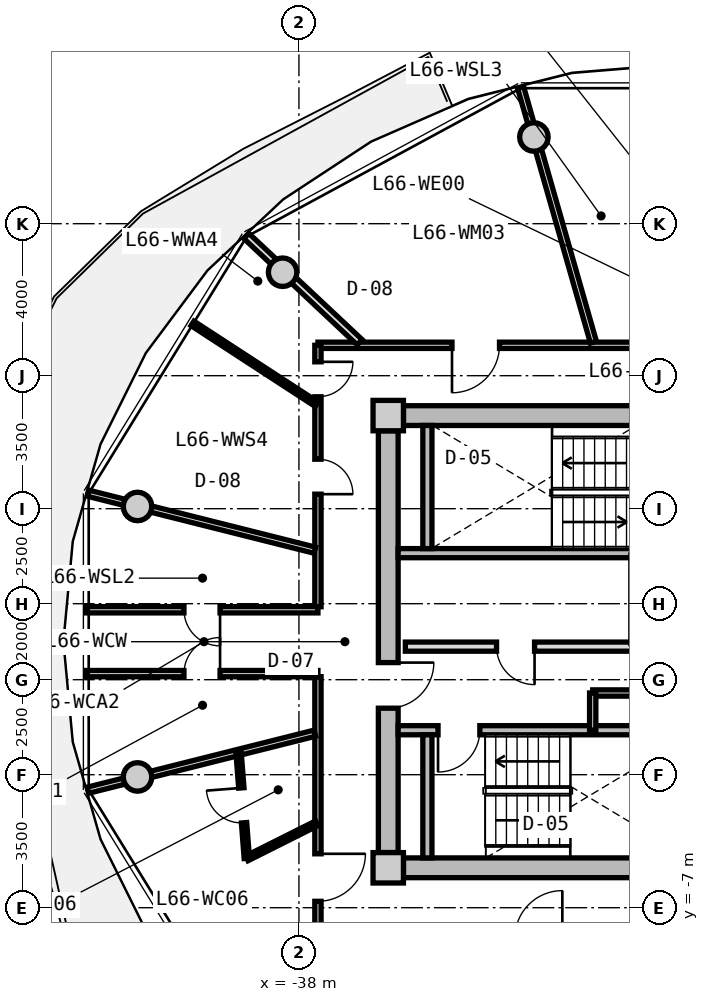
"""IFC4 building model, lengths in metres.
Left out: names, types, materials, properties, quantities, classifications, styles, units other than length and angle.
Written with IfcOpenShell. Run it as: python <this file> out.ifc"""

import sys

from ifc_helpers import new_model, si_unit, direction, frame, frame_2d, origin, origin_2d, place, context, subcontext, project, spatial, rectangle, circle, extrude, source, transform, mapped, element, fill, save


model = new_model("IFC4")
c1 = context("Model", 3, precision=1e-05, world=origin(), true_north=direction((0.0, 1.0)))
c2 = subcontext(c1, "Body", "Model", "MODEL_VIEW")
j1 = project(units=[si_unit("LENGTHUNIT", "METRE"), si_unit("PLANEANGLEUNIT", "RADIAN")], contexts=[c1])
p1 = place(None, origin())
s1 = spatial("IfcSite", under=j1, at=p1, CompositionType="ELEMENT")
p2 = place(p1, origin())
s2 = spatial("IfcBuilding", under=s1, at=p2, CompositionType="ELEMENT")
p3 = place(p2, frame((0.0, 0.0, 213.9)))
s3 = spatial("IfcBuildingStorey", under=s2, at=p3, CompositionType="ELEMENT", Elevation=213.9)
m1 = source(origin(), c2, "Body", "SweptSolid", [
    extrude(rectangle(XDim=0.8, YDim=0.8, at=origin_2d()), origin(), (0.0, 0.0, 1.0), 3.05),
])
for number, where, z_axis, x_axis in (
    (1, (-35.65, -5.95, 0.0), (0.0, 0.0, 1.0), (1.0, 0.0, 0.0)),
    (2, (-35.65, 5.95, 0.0), (0.0, 0.0, 1.0), (1.0, 0.0, 0.0)),
):
    element("IfcColumn", number, at=place(p3, frame(where, z_axis=z_axis, x_axis=x_axis)), inside=s3, PredefinedType="COLUMN", context=c2, shape_type="MappedRepresentation", body=[
        mapped(m1, transform((0.0, 0.0, 0.0), x_axis=(1.0, 0.0, 0.0), y_axis=(0.0, 1.0, 0.0), z_axis=(0.0, 0.0, 1.0), scale=1.0)),
    ])
m2 = source(origin(), c2, "Body", "SweptSolid", [
    extrude(rectangle(XDim=14.5, YDim=0.52, at=frame_2d((7.25, 0.0))), origin(), (0.0, 0.0, 1.0), 2.76),
])
for number, where, z_axis, x_axis in (
    (3, (-35.25, 5.95, 0.0), (0.0, 0.0, 1.0), (1.0, 0.0, 0.0)),
    (4, (-20.75, -5.95, 0.0), (0.0, 0.0, 1.0), (-1.0, 0.0, 0.0)),
):
    element("IfcWall", number, at=place(p3, frame(where, z_axis=z_axis, x_axis=x_axis)), inside=s3, PredefinedType="SHEAR", context=c2, shape_type="MappedRepresentation", body=[
        mapped(m2, transform((0.0, 0.0, 0.0), x_axis=(1.0, 0.0, 0.0), y_axis=(0.0, 1.0, 0.0), z_axis=(0.0, 0.0, 1.0), scale=1.0)),
    ])
m3 = source(origin(), c2, "Body", "SweptSolid", [
    extrude(rectangle(XDim=11.1, YDim=0.52, at=frame_2d((5.55, 0.0))), origin(), (0.0, 0.0, 1.0), 2.76),
])
p4 = place(p3, frame((-35.65, -5.55, 0.0), z_axis=(0.0, 0.0, 1.0), x_axis=(0.0, 1.0, 0.0)))
e5 = element("IfcWall", 5, at=p4, inside=s3, PredefinedType="SHEAR", context=c2, shape_type="MappedRepresentation", body=[
    mapped(m3, transform((0.0, 0.0, 0.0), x_axis=(1.0, 0.0, 0.0), y_axis=(0.0, 1.0, 0.0), z_axis=(0.0, 0.0, 1.0), scale=1.0)),
])
p5 = place(p4, frame((3.8, 0.0, 0.0)))
e6 = element("IfcOpeningElement", 6, at=p5, cuts=e5, PredefinedType="OPENING", context=c2, shape_type="SweptSolid", body=[
    extrude(rectangle(XDim=1.2, YDim=2.15, at=frame_2d((0.6, 1.075))), frame((0.0, 0.27, 0.0), z_axis=(0.0, -1.0, 0.0), x_axis=(1.0, 0.0, 0.0)), (0.0, 0.0, 1.0), 0.54),
])
m4 = source(origin(), c2, "Body", "SweptSolid", [
    extrude(circle(Radius=0.375, at=origin_2d()), origin(), (0.0, 0.0, 1.0), 3.05),
])
for number, where, z_axis, x_axis in (
    (7, (-31.818, 13.281, 0.0), (0.0, 0.0, 1.0), (1.0, 0.0, 0.0)),
    (8, (-38.43, 9.723, 0.0), (0.0, 0.0, 1.0), (1.0, 0.0, 0.0)),
    (9, (-42.247, 3.559, 0.0), (0.0, 0.0, 1.0), (1.0, 0.0, 0.0)),
    (10, (-42.247, -3.559, 0.0), (0.0, 0.0, 1.0), (1.0, 0.0, 0.0)),
):
    element("IfcColumn", number, at=place(p3, frame(where, z_axis=z_axis, x_axis=x_axis)), inside=s3, PredefinedType="COLUMN", context=c2, shape_type="MappedRepresentation", body=[
        mapped(m4, transform((0.0, 0.0, 0.0), x_axis=(1.0, 0.0, 0.0), y_axis=(0.0, 1.0, 0.0), z_axis=(0.0, 0.0, 1.0), scale=1.0)),
    ])
m5 = source(origin(), c2, "Body", "SweptSolid", [
    extrude(rectangle(XDim=7.93, YDim=0.24, at=frame_2d((3.965, 0.0))), origin(), (0.0, 0.0, 1.0), 2.76),
])
p6 = place(p3, frame((-35.39, 2.33, 0.0), z_axis=(0.0, 0.0, 1.0), x_axis=(1.0, 0.0, 0.0)))
e11 = element("IfcWall", 11, at=p6, inside=s3, PredefinedType="PARTITIONING", context=c2, shape_type="MappedRepresentation", body=[
    mapped(m5, transform((0.0, 0.0, 0.0), x_axis=(1.0, 0.0, 0.0), y_axis=(0.0, 1.0, 0.0), z_axis=(0.0, 0.0, 1.0), scale=1.0)),
])
m6 = source(origin(), c2, "Body", "SweptSolid", [
    extrude(rectangle(XDim=3.24, YDim=0.24, at=frame_2d((1.62, 0.0))), origin(), (0.0, 0.0, 1.0), 2.76),
])
p7 = place(p3, frame((-34.62, 2.45, 0.0), z_axis=(0.0, 0.0, 1.0), x_axis=(0.0, 1.0, 0.0)))
e12 = element("IfcWall", 12, at=p7, inside=s3, PredefinedType="PARTITIONING", context=c2, shape_type="MappedRepresentation", body=[
    mapped(m6, transform((0.0, 0.0, 0.0), x_axis=(1.0, 0.0, 0.0), y_axis=(0.0, 1.0, 0.0), z_axis=(0.0, 0.0, 1.0), scale=1.0)),
])
p8 = place(p3, frame((-35.39, -2.33, 0.0), z_axis=(0.0, 0.0, 1.0), x_axis=(1.0, 0.0, 0.0)))
e13 = element("IfcWall", 13, at=p8, inside=s3, PredefinedType="PARTITIONING", context=c2, shape_type="MappedRepresentation", body=[
    mapped(m5, transform((0.0, 0.0, 0.0), x_axis=(1.0, 0.0, 0.0), y_axis=(0.0, 1.0, 0.0), z_axis=(0.0, 0.0, 1.0), scale=1.0)),
])
p9 = place(p8, frame((1.05, 0.0, 0.0)))
e14 = element("IfcOpeningElement", 14, at=p9, cuts=e13, PredefinedType="OPENING", context=c2, shape_type="SweptSolid", body=[
    extrude(rectangle(XDim=1.1, YDim=2.15, at=frame_2d((0.55, 1.075))), frame((0.0, 0.13, 0.0), z_axis=(0.0, -1.0, 0.0), x_axis=(1.0, 0.0, 0.0)), (0.0, 0.0, 1.0), 0.26),
])
p10 = place(p3, frame((-34.62, -5.69, 0.0), z_axis=(0.0, 0.0, 1.0), x_axis=(0.0, 1.0, 0.0)))
e15 = element("IfcWall", 15, at=p10, inside=s3, PredefinedType="PARTITIONING", context=c2, shape_type="MappedRepresentation", body=[
    mapped(m6, transform((0.0, 0.0, 0.0), x_axis=(1.0, 0.0, 0.0), y_axis=(0.0, 1.0, 0.0), z_axis=(0.0, 0.0, 1.0), scale=1.0)),
])
m7 = source(origin(), c2, "Body", "SweptSolid", [
    extrude(rectangle(XDim=7.62, YDim=0.24, at=frame_2d((3.81, 0.0))), origin(), (0.0, 0.0, 1.0), 2.745),
])
p11 = place(p3, frame((-35.2, -0.13, 0.0), z_axis=(0.0, 0.0, 1.0), x_axis=(1.0, 0.0, 0.0)))
e16 = element("IfcWall", 16, at=p11, inside=s3, PredefinedType="PARTITIONING", context=c2, shape_type="MappedRepresentation", body=[
    mapped(m7, transform((0.0, 0.0, 0.0), x_axis=(1.0, 0.0, 0.0), y_axis=(0.0, 1.0, 0.0), z_axis=(0.0, 0.0, 1.0), scale=1.0)),
])
p12 = place(p11, frame((6.22, 0.0, 0.0)))
e17 = element("IfcOpeningElement", 17, at=p12, cuts=e16, PredefinedType="OPENING", context=c2, shape_type="SweptSolid", body=[
    extrude(rectangle(XDim=1.0, YDim=2.1, at=frame_2d((0.5, 1.05))), frame((0.0, 0.13, 0.0), z_axis=(0.0, -1.0, 0.0), x_axis=(1.0, 0.0, 0.0)), (0.0, 0.0, 1.0), 0.26),
])
p13 = place(p11, frame((2.4, 0.0, 0.0)))
e18 = element("IfcOpeningElement", 18, at=p13, cuts=e16, PredefinedType="OPENING", context=c2, shape_type="SweptSolid", body=[
    extrude(rectangle(XDim=1.0, YDim=2.1, at=frame_2d((0.5, 1.05))), frame((0.0, 0.13, 0.0), z_axis=(0.0, -1.0, 0.0), x_axis=(1.0, 0.0, 0.0)), (0.0, 0.0, 1.0), 0.26),
])
m8 = source(origin(), c2, "Body", "SweptSolid", [
    extrude(rectangle(XDim=4.77, YDim=0.165, at=frame_2d((2.385, 0.0))), origin(), (0.0, 0.0, 1.0), 2.745),
])
p14 = place(p3, frame((-30.27, -1.35, 0.0), z_axis=(0.0, 0.0, 1.0), x_axis=(1.0, 0.0, 0.0)))
e19 = element("IfcWall", 19, at=p14, inside=s3, PredefinedType="PARTITIONING", context=c2, shape_type="MappedRepresentation", body=[
    mapped(m8, transform((0.0, 0.0, 0.0), x_axis=(1.0, 0.0, 0.0), y_axis=(0.0, 1.0, 0.0), z_axis=(0.0, 0.0, 1.0), scale=1.0)),
])
p15 = place(p14, frame((1.85, 0.0, 0.0)))
e20 = element("IfcOpeningElement", 20, at=p15, cuts=e19, PredefinedType="OPENING", context=c2, shape_type="SweptSolid", body=[
    extrude(rectangle(XDim=1.0, YDim=2.1, at=frame_2d((0.5, 1.05))), frame((0.0, 0.093, 0.0), z_axis=(0.0, -1.0, 0.0), x_axis=(1.0, 0.0, 0.0)), (0.0, 0.0, 1.0), 0.185),
])
m9 = source(origin(), c2, "Body", "SweptSolid", [
    extrude(rectangle(XDim=0.98, YDim=0.165, at=frame_2d((0.49, 0.0))), origin(), (0.0, 0.0, 1.0), 2.745),
])
p16 = place(p3, frame((-30.27, -2.33, 0.0), z_axis=(0.0, 0.0, 1.0), x_axis=(0.0, 1.0, 0.0)))
e21 = element("IfcWall", 21, at=p16, inside=s3, PredefinedType="PARTITIONING", context=c2, shape_type="MappedRepresentation", body=[
    mapped(m9, transform((0.0, 0.0, 0.0), x_axis=(1.0, 0.0, 0.0), y_axis=(0.0, 1.0, 0.0), z_axis=(0.0, 0.0, 1.0), scale=1.0)),
])
m10 = source(origin(), c2, "Body", "SweptSolid", [
    extrude(rectangle(XDim=8.58, YDim=0.165, at=frame_2d((4.29, 0.0))), origin(), (0.0, 0.0, 1.0), 2.745),
])
p17 = place(p3, frame((-37.5, 7.8, 0.0), z_axis=(0.0, 0.0, 1.0), x_axis=(1.0, 0.0, 0.0)))
e22 = element("IfcWall", 22, at=p17, inside=s3, PredefinedType="PARTITIONING", context=c2, shape_type="MappedRepresentation", body=[
    mapped(m10, transform((0.0, 0.0, 0.0), x_axis=(1.0, 0.0, 0.0), y_axis=(0.0, 1.0, 0.0), z_axis=(0.0, 0.0, 1.0), scale=1.0)),
])
p18 = place(p17, frame((3.528, 0.0, 0.0)))
e23 = element("IfcOpeningElement", 23, at=p18, cuts=e22, PredefinedType="OPENING", context=c2, shape_type="SweptSolid", body=[
    extrude(rectangle(XDim=1.25, YDim=2.2, at=frame_2d((0.625, 1.1))), frame((0.0, 0.093, 0.0), z_axis=(0.0, -1.0, 0.0), x_axis=(1.0, 0.0, 0.0)), (0.0, 0.0, 1.0), 0.185),
])
m11 = source(origin(), c2, "Body", "SweptSolid", [
    extrude(rectangle(XDim=6.88, YDim=0.165, at=frame_2d((3.44, 0.0))), origin(), (0.0, 0.0, 1.0), 2.745),
])
p19 = place(p3, frame((-37.5, -7.8, 0.0), z_axis=(0.0, 0.0, 1.0), x_axis=(0.0, 1.0, 0.0)))
e24 = element("IfcWall", 24, at=p19, inside=s3, PredefinedType="PARTITIONING", context=c2, shape_type="MappedRepresentation", body=[
    mapped(m11, transform((0.0, 0.0, 0.0), x_axis=(1.0, 0.0, 0.0), y_axis=(0.0, 1.0, 0.0), z_axis=(0.0, 0.0, 1.0), scale=1.0)),
])
p20 = place(p19, frame((0.968, 0.0, 0.0)))
e25 = element("IfcOpeningElement", 25, at=p20, cuts=e24, PredefinedType="OPENING", context=c2, shape_type="SweptSolid", body=[
    extrude(rectangle(XDim=1.25, YDim=2.2, at=frame_2d((0.625, 1.1))), frame((0.0, 0.093, 0.0), z_axis=(0.0, -1.0, 0.0), x_axis=(1.0, 0.0, 0.0)), (0.0, 0.0, 1.0), 0.185),
])
p21 = place(p3, frame((-37.5, 0.92, 0.0), z_axis=(0.0, 0.0, 1.0), x_axis=(0.0, 1.0, 0.0)))
e26 = element("IfcWall", 26, at=p21, inside=s3, PredefinedType="PARTITIONING", context=c2, shape_type="MappedRepresentation", body=[
    mapped(m11, transform((0.0, 0.0, 0.0), x_axis=(1.0, 0.0, 0.0), y_axis=(0.0, 1.0, 0.0), z_axis=(0.0, 0.0, 1.0), scale=1.0)),
])
p22 = place(p21, frame((5.525, 0.0, 0.0)))
e27 = element("IfcOpeningElement", 27, at=p22, cuts=e26, PredefinedType="OPENING", context=c2, shape_type="SweptSolid", body=[
    extrude(rectangle(XDim=0.92, YDim=2.1, at=frame_2d((0.46, 1.05))), frame((0.0, 0.093, 0.0), z_axis=(0.0, -1.0, 0.0), x_axis=(1.0, 0.0, 0.0)), (0.0, 0.0, 1.0), 0.185),
])
p23 = place(p21, frame((2.962, 0.0, 0.0)))
e28 = element("IfcOpeningElement", 28, at=p23, cuts=e26, PredefinedType="OPENING", context=c2, shape_type="SweptSolid", body=[
    extrude(rectangle(XDim=0.92, YDim=2.1, at=frame_2d((0.46, 1.05))), frame((0.0, 0.093, 0.0), z_axis=(0.0, -1.0, 0.0), x_axis=(1.0, 0.0, 0.0)), (0.0, 0.0, 1.0), 0.185),
])
m12 = source(origin(), c2, "Body", "SweptSolid", [
    extrude(rectangle(XDim=6.974, YDim=0.165, at=frame_2d((3.487, 0.0))), origin(), (0.0, 0.0, 1.0), 2.345),
])
p24 = place(p3, frame((-30.251, 7.88, 0.0), z_axis=(0.0, 0.0, 1.0), x_axis=(-0.274707256801, 0.961527910703, 0.0)))
e29 = element("IfcWall", 29, at=p24, inside=s3, PredefinedType="PARTITIONING", context=c2, shape_type="MappedRepresentation", body=[
    mapped(m12, transform((0.0, 0.0, 0.0), x_axis=(1.0, 0.0, 0.0), y_axis=(0.0, 1.0, 0.0), z_axis=(0.0, 0.0, 1.0), scale=1.0)),
])
m13 = source(origin(), c2, "Body", "SweptSolid", [
    extrude(rectangle(XDim=6.157, YDim=0.165, at=frame_2d((3.079, 0.0))), origin(), (0.0, 0.0, 1.0), 2.345),
])
for number, where, z_axis, x_axis in (
    (30, (-37.58, 2.407, 0.0), (0.0, 0.0, 1.0), (-0.97, 0.244, 0.0)),
    (31, (-37.58, -2.407, 0.0), (0.0, 0.0, 1.0), (-0.97, -0.244, 0.0)),
):
    element("IfcWall", number, at=place(p3, frame(where, z_axis=z_axis, x_axis=x_axis)), inside=s3, PredefinedType="PARTITIONING", context=c2, shape_type="MappedRepresentation", body=[
        mapped(m13, transform((0.0, 0.0, 0.0), x_axis=(1.0, 0.0, 0.0), y_axis=(0.0, 1.0, 0.0), z_axis=(0.0, 0.0, 1.0), scale=1.0)),
    ])
m14 = source(origin(), c2, "Body", "SweptSolid", [
    extrude(rectangle(XDim=6.101, YDim=0.165, at=frame_2d((3.051, 0.0))), origin(), (0.0, 0.0, 1.0), 2.745),
])
p25 = place(p3, frame((-43.601, 0.84, 0.0), z_axis=(0.0, 0.0, 1.0), x_axis=(1.0, 0.0, 0.0)))
e32 = element("IfcWall", 32, at=p25, inside=s3, PredefinedType="PARTITIONING", context=c2, shape_type="MappedRepresentation", body=[
    mapped(m14, transform((0.0, 0.0, 0.0), x_axis=(1.0, 0.0, 0.0), y_axis=(0.0, 1.0, 0.0), z_axis=(0.0, 0.0, 1.0), scale=1.0)),
])
p26 = place(p25, frame((2.576, 0.0, 0.0)))
e33 = element("IfcOpeningElement", 33, at=p26, cuts=e32, PredefinedType="OPENING", context=c2, shape_type="SweptSolid", body=[
    extrude(rectangle(XDim=0.95, YDim=2.1, at=frame_2d((0.475, 1.05))), frame((0.0, 0.093, 0.0), z_axis=(0.0, -1.0, 0.0), x_axis=(1.0, 0.0, 0.0)), (0.0, 0.0, 1.0), 0.185),
])
p27 = place(p3, frame((-37.5, -0.84, 0.0), z_axis=(0.0, 0.0, 1.0), x_axis=(-1.0, 0.0, 0.0)))
e34 = element("IfcWall", 34, at=p27, inside=s3, PredefinedType="PARTITIONING", context=c2, shape_type="MappedRepresentation", body=[
    mapped(m14, transform((0.0, 0.0, 0.0), x_axis=(1.0, 0.0, 0.0), y_axis=(0.0, 1.0, 0.0), z_axis=(0.0, 0.0, 1.0), scale=1.0)),
])
p28 = place(p27, frame((2.576, 0.0, 0.0)))
e35 = element("IfcOpeningElement", 35, at=p28, cuts=e34, PredefinedType="OPENING", context=c2, shape_type="SweptSolid", body=[
    extrude(rectangle(XDim=0.95, YDim=2.1, at=frame_2d((0.475, 1.05))), frame((0.0, 0.093, 0.0), z_axis=(0.0, -1.0, 0.0), x_axis=(1.0, 0.0, 0.0)), (0.0, 0.0, 1.0), 0.185),
])
m15 = source(origin(), c2, "Body", "SweptSolid", [
    extrude(rectangle(XDim=4.089, YDim=0.19, at=frame_2d((2.044, 0.0))), origin(), (0.0, 0.0, 1.0), 2.345),
])
p29 = place(p3, frame((-36.402, 7.88, 0.0), z_axis=(0.0, 0.0, 1.0), x_axis=(-0.729401273609, 0.684086092577, 0.0)))
e36 = element("IfcWall", 36, at=p29, inside=s3, PredefinedType="PARTITIONING", context=c2, shape_type="MappedRepresentation", body=[
    mapped(m15, transform((0.0, 0.0, 0.0), x_axis=(1.0, 0.0, 0.0), y_axis=(0.0, 1.0, 0.0), z_axis=(0.0, 0.0, 1.0), scale=1.0)),
])
m16 = source(origin(), c2, "Body", "SweptSolid", [
    extrude(rectangle(XDim=3.904, YDim=0.14, at=frame_2d((1.952, 0.0))), origin(), (0.0, 0.0, 1.0), 2.745),
])
p30 = place(p3, frame((-37.53, 6.246, 0.0), z_axis=(0.0, 0.0, 1.0), x_axis=(-0.838024687996, 0.545632314209, 0.0)))
e37 = element("IfcWall", 37, at=p30, inside=s3, PredefinedType="PARTITIONING", context=c2, shape_type="MappedRepresentation", body=[
    mapped(m16, transform((0.0, 0.0, 0.0), x_axis=(1.0, 0.0, 0.0), y_axis=(0.0, 1.0, 0.0), z_axis=(0.0, 0.0, 1.0), scale=1.0)),
])
m17 = source(origin(), c2, "Body", "SweptSolid", [
    extrude(rectangle(XDim=2.06, YDim=0.14, at=frame_2d((1.03, 0.0))), origin(), (0.0, 0.0, 1.0), 2.745),
])
p31 = place(p3, frame((-37.53, -4.778, 0.0), z_axis=(0.0, 0.0, 1.0), x_axis=(-0.893952568722, -0.448161583444, 0.0)))
e38 = element("IfcWall", 38, at=p31, inside=s3, PredefinedType="PARTITIONING", context=c2, shape_type="MappedRepresentation", body=[
    mapped(m17, transform((0.0, 0.0, 0.0), x_axis=(1.0, 0.0, 0.0), y_axis=(0.0, 1.0, 0.0), z_axis=(0.0, 0.0, 1.0), scale=1.0)),
])
m18 = source(origin(), c2, "Body", "SweptSolid", [
    extrude(rectangle(XDim=2.798, YDim=0.14, at=frame_2d((1.399, 0.0))), origin(), (0.0, 0.0, 1.0), 2.745),
])
p32 = place(p3, frame((-39.371, -5.701, 0.0), z_axis=(0.0, 0.0, 1.0), x_axis=(-0.077823984089, 0.996967114553, 0.0)))
e39 = element("IfcWall", 39, at=p32, inside=s3, PredefinedType="PARTITIONING", context=c2, shape_type="MappedRepresentation", body=[
    mapped(m18, transform((0.0, 0.0, 0.0), x_axis=(1.0, 0.0, 0.0), y_axis=(0.0, 1.0, 0.0), z_axis=(0.0, 0.0, 1.0), scale=1.0)),
])
p33 = place(p32, frame((0.939, 0.0, 0.0)))
e40 = element("IfcOpeningElement", 40, at=p33, cuts=e39, PredefinedType="OPENING", context=c2, shape_type="SweptSolid", body=[
    extrude(rectangle(XDim=0.92, YDim=2.1, at=frame_2d((0.46, 1.05))), frame((0.0, 0.08, 0.0), z_axis=(0.0, -1.0, 0.0), x_axis=(1.0, 0.0, 0.0)), (0.0, 0.0, 1.0), 0.16),
])
m19 = source(origin(), c2, "Body", "SweptSolid", [
    extrude(rectangle(XDim=1.1, YDim=2.15, at=frame_2d((0.55, 1.075))), frame((0.0, 0.025, 0.0), z_axis=(0.0, -1.0, 0.0), x_axis=(1.0, 0.0, 0.0)), (0.0, 0.0, 1.0), 0.05),
])
p34 = place(p9, frame((1.1, 0.0, 0.0), z_axis=(0.0, 0.0, 1.0), x_axis=(-1.0, 0.0, 0.0)))
e41 = element("IfcDoor", 41, at=p34, inside=s3, OperationType="SINGLE_SWING_RIGHT", PredefinedType="DOOR", context=c2, shape_type="MappedRepresentation", body=[
    mapped(m19, transform((0.0, 0.0, 0.0), x_axis=(1.0, 0.0, 0.0), y_axis=(0.0, 1.0, 0.0), z_axis=(0.0, 0.0, 1.0), scale=1.0)),
])
fill(e14, e41)
m20 = source(origin(), c2, "Body", "SweptSolid", [
    extrude(rectangle(XDim=1.2, YDim=2.15, at=frame_2d((0.6, 1.075))), frame((0.0, 0.025, 0.0), z_axis=(0.0, -1.0, 0.0), x_axis=(1.0, 0.0, 0.0)), (0.0, 0.0, 1.0), 0.05),
])
p35 = place(p5, frame((1.2, 0.0, 0.0), z_axis=(0.0, 0.0, 1.0), x_axis=(-1.0, 0.0, 0.0)))
e42 = element("IfcDoor", 42, at=p35, inside=s3, OperationType="SINGLE_SWING_LEFT", PredefinedType="DOOR", context=c2, shape_type="MappedRepresentation", body=[
    mapped(m20, transform((0.0, 0.0, 0.0), x_axis=(1.0, 0.0, 0.0), y_axis=(0.0, 1.0, 0.0), z_axis=(0.0, 0.0, 1.0), scale=1.0)),
])
fill(e6, e42)
m21 = source(origin(), c2, "Body", "SweptSolid", [
    extrude(rectangle(XDim=1.0, YDim=2.1, at=frame_2d((0.5, 1.05))), frame((0.0, 0.025, 0.0), z_axis=(0.0, -1.0, 0.0), x_axis=(1.0, 0.0, 0.0)), (0.0, 0.0, 1.0), 0.05),
])
p36 = place(p13, frame((1.0, 0.0, 0.0), z_axis=(0.0, 0.0, 1.0), x_axis=(-1.0, 0.0, 0.0)))
e43 = element("IfcDoor", 43, at=p36, inside=s3, OperationType="SINGLE_SWING_LEFT", PredefinedType="DOOR", context=c2, shape_type="MappedRepresentation", body=[
    mapped(m21, transform((0.0, 0.0, 0.0), x_axis=(1.0, 0.0, 0.0), y_axis=(0.0, 1.0, 0.0), z_axis=(0.0, 0.0, 1.0), scale=1.0)),
])
fill(e18, e43)
m22 = source(origin(), c2, "Body", "SweptSolid", [
    extrude(rectangle(XDim=0.95, YDim=2.1, at=frame_2d((0.475, 1.05))), frame((0.0, 0.025, 0.0), z_axis=(0.0, -1.0, 0.0), x_axis=(1.0, 0.0, 0.0)), (0.0, 0.0, 1.0), 0.05),
])
p37 = place(p28, frame((0.95, 0.0, 0.0), z_axis=(0.0, 0.0, 1.0), x_axis=(-1.0, 0.0, 0.0)))
e44 = element("IfcDoor", 44, at=p37, inside=s3, OperationType="SINGLE_SWING_RIGHT", PredefinedType="DOOR", context=c2, shape_type="MappedRepresentation", body=[
    mapped(m22, transform((0.0, 0.0, 0.0), x_axis=(1.0, 0.0, 0.0), y_axis=(0.0, 1.0, 0.0), z_axis=(0.0, 0.0, 1.0), scale=1.0)),
])
fill(e35, e44)
p38 = place(p26, frame((0.95, 0.0, 0.0), z_axis=(0.0, 0.0, 1.0), x_axis=(-1.0, 0.0, 0.0)))
e45 = element("IfcDoor", 45, at=p38, inside=s3, OperationType="SINGLE_SWING_LEFT", PredefinedType="DOOR", context=c2, shape_type="MappedRepresentation", body=[
    mapped(m22, transform((0.0, 0.0, 0.0), x_axis=(1.0, 0.0, 0.0), y_axis=(0.0, 1.0, 0.0), z_axis=(0.0, 0.0, 1.0), scale=1.0)),
])
fill(e33, e45)
m23 = source(origin(), c2, "Body", "SweptSolid", [
    extrude(rectangle(XDim=1.25, YDim=2.2, at=frame_2d((0.625, 1.1))), frame((0.0, 0.025, 0.0), z_axis=(0.0, -1.0, 0.0), x_axis=(1.0, 0.0, 0.0)), (0.0, 0.0, 1.0), 0.05),
])
p39 = place(p18, frame((1.25, 0.0, 0.0), z_axis=(0.0, 0.0, 1.0), x_axis=(-1.0, 0.0, 0.0)))
e46 = element("IfcDoor", 46, at=p39, inside=s3, OperationType="SINGLE_SWING_RIGHT", PredefinedType="DOOR", context=c2, shape_type="MappedRepresentation", body=[
    mapped(m23, transform((0.0, 0.0, 0.0), x_axis=(1.0, 0.0, 0.0), y_axis=(0.0, 1.0, 0.0), z_axis=(0.0, 0.0, 1.0), scale=1.0)),
])
fill(e23, e46)
m24 = source(origin(), c2, "Body", "SweptSolid", [
    extrude(rectangle(XDim=0.92, YDim=2.1, at=frame_2d((0.46, 1.05))), frame((0.0, 0.025, 0.0), z_axis=(0.0, -1.0, 0.0), x_axis=(1.0, 0.0, 0.0)), (0.0, 0.0, 1.0), 0.05),
])
p40 = place(p22, frame((0.92, 0.0, 0.0), z_axis=(0.0, 0.0, 1.0), x_axis=(-1.0, 0.0, 0.0)))
e47 = element("IfcDoor", 47, at=p40, inside=s3, OperationType="SINGLE_SWING_LEFT", PredefinedType="DOOR", context=c2, shape_type="MappedRepresentation", body=[
    mapped(m24, transform((0.0, 0.0, 0.0), x_axis=(1.0, 0.0, 0.0), y_axis=(0.0, 1.0, 0.0), z_axis=(0.0, 0.0, 1.0), scale=1.0)),
])
fill(e27, e47)
p41 = place(p23, frame((0.92, 0.0, 0.0), z_axis=(0.0, 0.0, 1.0), x_axis=(-1.0, 0.0, 0.0)))
e48 = element("IfcDoor", 48, at=p41, inside=s3, OperationType="SINGLE_SWING_RIGHT", PredefinedType="DOOR", context=c2, shape_type="MappedRepresentation", body=[
    mapped(m24, transform((0.0, 0.0, 0.0), x_axis=(1.0, 0.0, 0.0), y_axis=(0.0, 1.0, 0.0), z_axis=(0.0, 0.0, 1.0), scale=1.0)),
])
fill(e28, e48)
p42 = place(p20, frame((1.25, 0.0, 0.0), z_axis=(0.0, 0.0, 1.0), x_axis=(-1.0, 0.0, 0.0)))
e49 = element("IfcDoor", 49, at=p42, inside=s3, OperationType="SINGLE_SWING_LEFT", PredefinedType="DOOR", context=c2, shape_type="MappedRepresentation", body=[
    mapped(m23, transform((0.0, 0.0, 0.0), x_axis=(1.0, 0.0, 0.0), y_axis=(0.0, 1.0, 0.0), z_axis=(0.0, 0.0, 1.0), scale=1.0)),
])
fill(e25, e49)
p43 = place(p33, origin())
e50 = element("IfcDoor", 50, at=p43, inside=s3, OperationType="SINGLE_SWING_RIGHT", PredefinedType="DOOR", context=c2, shape_type="MappedRepresentation", body=[
    mapped(m24, transform((0.0, 0.0, 0.0), x_axis=(1.0, 0.0, 0.0), y_axis=(0.0, 1.0, 0.0), z_axis=(0.0, 0.0, 1.0), scale=1.0)),
])
fill(e40, e50)
save(model, sys.argv[1])
